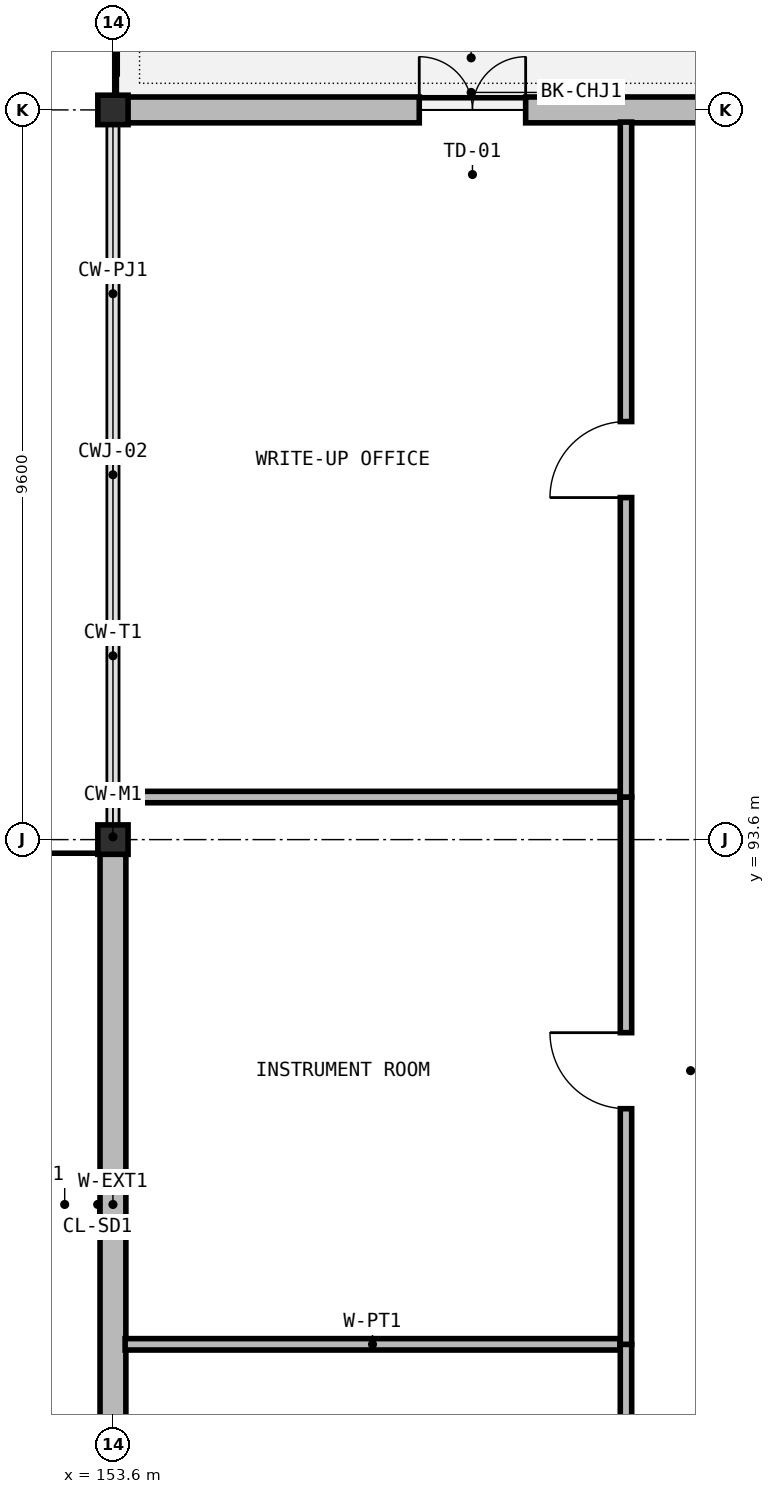
"""IFC4 building model, lengths in metres.
Left out: names, types, materials, properties, quantities, classifications, styles, units other than length and angle.
Written with IfcOpenShell. Run it as: python <this file> out.ifc"""

import sys

from ifc_helpers import new_model, si_unit, direction, frame, frame_2d, origin, origin_2d, place, context, subcontext, project, spatial, rectangle, i_section, extrude, element, fill, save


model = new_model("IFC4")
c1 = context("Model", 3, precision=1e-05, world=origin(), true_north=direction((0.0, 1.0)))
c2 = subcontext(c1, "Body", "Model", "MODEL_VIEW")
j1 = project(units=[si_unit("LENGTHUNIT", "METRE"), si_unit("PLANEANGLEUNIT", "RADIAN")], contexts=[c1])
p1 = place(None, origin())
s1 = spatial("IfcSite", under=j1, at=p1, CompositionType="ELEMENT")
p2 = place(p1, origin())
s2 = spatial("IfcBuilding", under=s1, at=p2, CompositionType="ELEMENT")
p3 = place(p2, frame((0.0, 0.0, 5.25)))
s3 = spatial("IfcBuildingStorey", under=s2, at=p3, CompositionType="ELEMENT", Elevation=5.25)
for number, where, z_axis, x_axis in (
    (1, (153.6, 93.6, 0.0), (0.0, 0.0, 1.0), (1.0, 0.0, 0.0)),
    (2, (153.6, 103.2, 0.0), (0.0, 0.0, 1.0), (1.0, 0.0, 0.0)),
):
    element("IfcColumn", number, at=place(p3, frame(where, z_axis=z_axis, x_axis=x_axis)), inside=s3, PredefinedType="COLUMN", context=c2, shape_type="SweptSolid", body=[
        extrude(i_section(OverallWidth=0.398, OverallDepth=0.387, WebThickness=0.024, FlangeThickness=0.039, at=origin_2d()), origin(), (0.0, 0.0, 1.0), 4.55),
    ])
p4 = place(p3, frame((153.6, 84.004, 0.0), z_axis=(0.0, 0.0, 1.0), x_axis=(0.0, 1.0, 0.0)))
e3 = element("IfcWall", 3, at=p4, inside=s3, PredefinedType="SOLIDWALL", context=c2, shape_type="SweptSolid", body=[
    extrude(rectangle(XDim=9.592, YDim=0.34, at=frame_2d((4.796, 0.0))), origin(), (0.0, 0.0, 1.0), 3.893),
])
p5 = place(p3, frame((153.43, 103.2, 0.0), z_axis=(0.0, 0.0, 1.0), x_axis=(1.0, 0.0, 0.0)))
e4 = element("IfcWall", 4, at=p5, inside=s3, PredefinedType="SOLIDWALL", context=c2, shape_type="SweptSolid", body=[
    extrude(rectangle(XDim=9.766, YDim=0.34, at=frame_2d((4.883, 0.0))), origin(), (0.0, 0.0, 1.0), 3.764),
])
p6 = place(p5, frame((4.2, 0.0, 0.0)))
e5 = element("IfcOpeningElement", 5, at=p6, cuts=e4, PredefinedType="OPENING", context=c2, shape_type="SweptSolid", body=[
    extrude(rectangle(XDim=1.4, YDim=2.2, at=frame_2d((0.7, 1.1))), frame((0.0, 0.18, 0.0), z_axis=(0.0, -1.0, 0.0), x_axis=(1.0, 0.0, 0.0)), (0.0, 0.0, 1.0), 0.36),
])
p7 = place(p3, frame((160.35, 77.16, 0.0), z_axis=(0.0, 0.0, 1.0), x_axis=(0.0, 1.0, 0.0)))
e6 = element("IfcWall", 6, at=p7, inside=s3, PredefinedType="PARTITIONING", context=c2, shape_type="SweptSolid", body=[
    extrude(rectangle(XDim=9.8, YDim=0.15, at=frame_2d((4.9, 0.0))), origin(), (0.0, 0.0, 1.0), 4.23),
])
p8 = place(p7, frame((4.4, 0.0, 0.0)))
e7 = element("IfcOpeningElement", 7, at=p8, cuts=e6, PredefinedType="OPENING", context=c2, shape_type="SweptSolid", body=[
    extrude(rectangle(XDim=1.0, YDim=2.2, at=frame_2d((0.5, 1.1))), frame((0.0, 0.085, 0.0), z_axis=(0.0, -1.0, 0.0), x_axis=(1.0, 0.0, 0.0)), (0.0, 0.0, 1.0), 0.17),
])
p9 = place(p3, frame((153.76, 86.96, 0.0), z_axis=(0.0, 0.0, 1.0), x_axis=(1.0, 0.0, 0.0)))
e8 = element("IfcWall", 8, at=p9, inside=s3, PredefinedType="PARTITIONING", context=c2, shape_type="SweptSolid", body=[
    extrude(rectangle(XDim=6.51, YDim=0.15, at=frame_2d((3.255, 0.0))), origin(), (0.0, 0.0, 1.0), 4.23),
])
p10 = place(p3, frame((160.35, 86.96, 0.0), z_axis=(0.0, 0.0, 1.0), x_axis=(0.0, 1.0, 0.0)))
e9 = element("IfcWall", 9, at=p10, inside=s3, PredefinedType="PARTITIONING", context=c2, shape_type="SweptSolid", body=[
    extrude(rectangle(XDim=7.2, YDim=0.15, at=frame_2d((3.6, 0.0))), origin(), (0.0, 0.0, 1.0), 4.23),
])
p11 = place(p10, frame((3.1, 0.0, 0.0)))
e10 = element("IfcOpeningElement", 10, at=p11, cuts=e9, PredefinedType="OPENING", context=c2, shape_type="SweptSolid", body=[
    extrude(rectangle(XDim=1.0, YDim=2.2, at=frame_2d((0.5, 1.1))), frame((0.0, 0.085, 0.0), z_axis=(0.0, -1.0, 0.0), x_axis=(1.0, 0.0, 0.0)), (0.0, 0.0, 1.0), 0.17),
])
p12 = place(p3, frame((153.66, 94.16, 0.0), z_axis=(0.0, 0.0, 1.0), x_axis=(1.0, 0.0, 0.0)))
e11 = element("IfcWall", 11, at=p12, inside=s3, PredefinedType="PARTITIONING", context=c2, shape_type="SweptSolid", body=[
    extrude(rectangle(XDim=6.61, YDim=0.15, at=frame_2d((3.305, 0.0))), origin(), (0.0, 0.0, 1.0), 4.23),
])
p13 = place(p3, frame((160.35, 94.16, 0.0), z_axis=(0.0, 0.0, 1.0), x_axis=(0.0, 1.0, 0.0)))
e12 = element("IfcWall", 12, at=p13, inside=s3, PredefinedType="PARTITIONING", context=c2, shape_type="SweptSolid", body=[
    extrude(rectangle(XDim=8.88, YDim=0.15, at=frame_2d((4.44, 0.0))), origin(), (0.0, 0.0, 1.0), 4.23),
])
p14 = place(p13, frame((3.94, 0.0, 0.0)))
e13 = element("IfcOpeningElement", 13, at=p14, cuts=e12, PredefinedType="OPENING", context=c2, shape_type="SweptSolid", body=[
    extrude(rectangle(XDim=1.0, YDim=2.2, at=frame_2d((0.5, 1.1))), frame((0.0, 0.085, 0.0), z_axis=(0.0, -1.0, 0.0), x_axis=(1.0, 0.0, 0.0)), (0.0, 0.0, 1.0), 0.17),
])
p15 = place(p6, origin())
e14 = element("IfcDoor", 14, at=p15, inside=s3, OperationType="DOUBLE_DOOR_SINGLE_SWING", PredefinedType="DOOR", context=c2, shape_type="SweptSolid", body=[
    extrude(rectangle(XDim=1.4, YDim=2.2, at=frame_2d((0.7, 1.1))), frame((0.0, 0.025, 0.0), z_axis=(0.0, -1.0, 0.0), x_axis=(1.0, 0.0, 0.0)), (0.0, 0.0, 1.0), 0.05),
])
fill(e5, e14)
p16 = place(p11, origin())
e15 = element("IfcDoor", 15, at=p16, inside=s3, OperationType="SINGLE_SWING_RIGHT", PredefinedType="DOOR", context=c2, shape_type="SweptSolid", body=[
    extrude(rectangle(XDim=1.0, YDim=2.2, at=frame_2d((0.5, 1.1))), frame((0.0, 0.025, 0.0), z_axis=(0.0, -1.0, 0.0), x_axis=(1.0, 0.0, 0.0)), (0.0, 0.0, 1.0), 0.05),
])
fill(e10, e15)
p17 = place(p14, origin())
e16 = element("IfcDoor", 16, at=p17, inside=s3, OperationType="SINGLE_SWING_LEFT", PredefinedType="DOOR", context=c2, shape_type="SweptSolid", body=[
    extrude(rectangle(XDim=1.0, YDim=2.2, at=frame_2d((0.5, 1.1))), frame((0.0, 0.025, 0.0), z_axis=(0.0, -1.0, 0.0), x_axis=(1.0, 0.0, 0.0)), (0.0, 0.0, 1.0), 0.05),
])
fill(e13, e16)
save(model, sys.argv[1])
